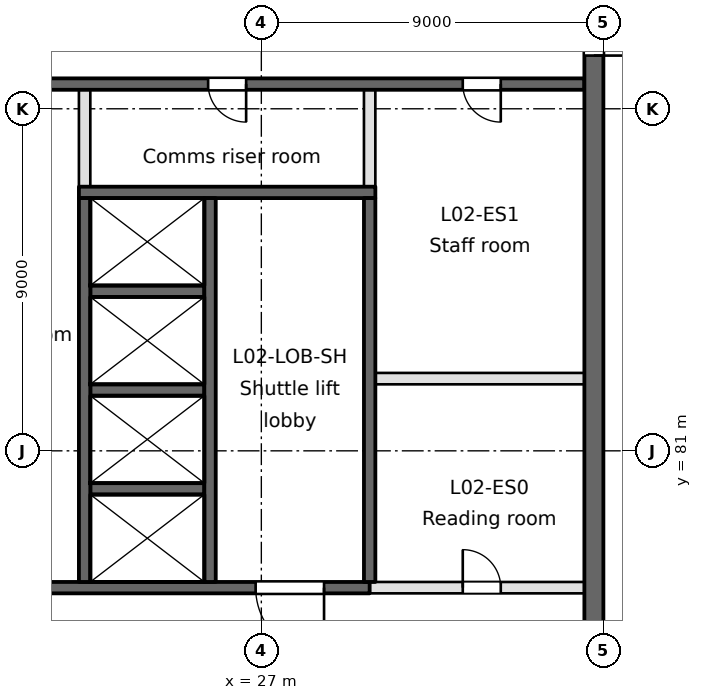
"""IFC4 building model, lengths in metres.
Left out: names, types, materials, properties, quantities, classifications, styles, units other than length and angle.
Written with IfcOpenShell. Run it as: python <this file> out.ifc"""

import sys

from ifc_helpers import new_model, si_unit, direction, frame, frame_2d, origin, place, context, subcontext, project, spatial, rectangle, extrude, element, fill, save


model = new_model("IFC4")
c1 = context("Model", 3, precision=1e-05, world=origin(), true_north=direction((0.0, 1.0)))
c2 = subcontext(c1, "Body", "Model", "MODEL_VIEW")
j1 = project(units=[si_unit("LENGTHUNIT", "METRE"), si_unit("PLANEANGLEUNIT", "RADIAN")], contexts=[c1])
p1 = place(None, origin())
s1 = spatial("IfcSite", under=j1, at=p1, CompositionType="ELEMENT")
p2 = place(p1, origin())
s2 = spatial("IfcBuilding", under=s1, at=p2, CompositionType="ELEMENT")
p3 = place(p2, frame((0.0, 0.0, 11.4)))
s3 = spatial("IfcBuildingStorey", under=s2, at=p3, CompositionType="ELEMENT", Elevation=11.4)
p4 = place(p3, frame((0.9, 77.4, -0.35), z_axis=(0.0, 0.0, 1.0), x_axis=(1.0, 0.0, 0.0)))
e1 = element("IfcWall", 1, at=p4, inside=s3, PredefinedType="SOLIDWALL", context=c2, shape_type="SweptSolid", body=[
    extrude(rectangle(XDim=28.95, YDim=0.3, at=frame_2d((14.475, 0.0))), origin(), (0.0, 0.0, 1.0), 5.4),
])
p5 = place(p4, frame((4.35, 0.0, 0.35)))
e2 = element("IfcOpeningElement", 2, at=p5, cuts=e1, PredefinedType="OPENING", context=c2, shape_type="SweptSolid", body=[
    extrude(rectangle(XDim=1.8, YDim=2.1, at=frame_2d((0.9, 1.05))), frame((0.0, 0.15, 0.0), z_axis=(0.0, -1.0, 0.0), x_axis=(1.0, 0.0, 0.0)), (0.0, 0.0, 1.0), 0.3),
])
p6 = place(p4, frame((25.95, 0.0, 0.35)))
e3 = element("IfcOpeningElement", 3, at=p6, cuts=e1, PredefinedType="OPENING", context=c2, shape_type="SweptSolid", body=[
    extrude(rectangle(XDim=1.8, YDim=2.1, at=frame_2d((0.9, 1.05))), frame((0.0, 0.15, 0.0), z_axis=(0.0, -1.0, 0.0), x_axis=(1.0, 0.0, 0.0)), (0.0, 0.0, 1.0), 0.3),
])
p7 = place(p4, frame((11.95, 0.0, 0.35)))
e4 = element("IfcOpeningElement", 4, at=p7, cuts=e1, PredefinedType="OPENING", context=c2, shape_type="SweptSolid", body=[
    extrude(rectangle(XDim=1.0, YDim=2.1, at=frame_2d((0.5, 1.05))), frame((0.0, 0.15, 0.0), z_axis=(0.0, -1.0, 0.0), x_axis=(1.0, 0.0, 0.0)), (0.0, 0.0, 1.0), 0.3),
])
p8 = place(p4, frame((19.15, 0.0, 0.35)))
e5 = element("IfcOpeningElement", 5, at=p8, cuts=e1, PredefinedType="OPENING", context=c2, shape_type="SweptSolid", body=[
    extrude(rectangle(XDim=1.0, YDim=2.1, at=frame_2d((0.5, 1.05))), frame((0.0, 0.15, 0.0), z_axis=(0.0, -1.0, 0.0), x_axis=(1.0, 0.0, 0.0)), (0.0, 0.0, 1.0), 0.3),
])
p9 = place(p3, frame((29.85, 77.4, 0.0), z_axis=(0.0, 0.0, 1.0), x_axis=(1.0, 0.0, 0.0)))
e6 = element("IfcWall", 6, at=p9, inside=s3, PredefinedType="PARTITIONING", context=c2, shape_type="SweptSolid", body=[
    extrude(rectangle(XDim=5.65, YDim=0.3, at=frame_2d((2.825, 0.0))), origin(), (0.0, 0.0, 1.0), 5.05),
])
p10 = place(p9, frame((2.45, 0.0, 0.0)))
e7 = element("IfcOpeningElement", 7, at=p10, cuts=e6, PredefinedType="OPENING", context=c2, shape_type="SweptSolid", body=[
    extrude(rectangle(XDim=1.0, YDim=2.1, at=frame_2d((0.5, 1.05))), frame((0.0, 0.15, 0.0), z_axis=(0.0, -1.0, 0.0), x_axis=(1.0, 0.0, 0.0)), (0.0, 0.0, 1.0), 0.3),
])
for number, where, z_axis, x_axis in (
    (8, (22.5, 80.0, -0.35), (0.0, 0.0, 1.0), (1.0, 0.0, 0.0)),
    (9, (22.5, 82.6, -0.35), (0.0, 0.0, 1.0), (1.0, 0.0, 0.0)),
):
    element("IfcWall", number, at=place(p3, frame(where, z_axis=z_axis, x_axis=x_axis)), inside=s3, PredefinedType="SOLIDWALL", context=c2, shape_type="SweptSolid", body=[
        extrude(rectangle(XDim=3.0, YDim=0.3, at=frame_2d((1.5, 0.0))), origin(), (0.0, 0.0, 1.0), 5.4),
    ])
p11 = place(p3, frame((30.0, 82.9, 0.0), z_axis=(0.0, 0.0, 1.0), x_axis=(1.0, 0.0, 0.0)))
e10 = element("IfcWall", 10, at=p11, inside=s3, PredefinedType="PARTITIONING", context=c2, shape_type="SweptSolid", body=[
    extrude(rectangle(XDim=5.5, YDim=0.3, at=frame_2d((2.75, 0.0))), origin(), (0.0, 0.0, 1.0), 5.05),
])
p12 = place(p3, frame((22.5, 85.2, -0.35), z_axis=(0.0, 0.0, 1.0), x_axis=(1.0, 0.0, 0.0)))
e11 = element("IfcWall", 11, at=p12, inside=s3, PredefinedType="SOLIDWALL", context=c2, shape_type="SweptSolid", body=[
    extrude(rectangle(XDim=3.0, YDim=0.3, at=frame_2d((1.5, 0.0))), origin(), (0.0, 0.0, 1.0), 5.4),
])
p13 = place(p3, frame((22.2, 87.8, -0.35), z_axis=(0.0, 0.0, 1.0), x_axis=(1.0, 0.0, 0.0)))
e12 = element("IfcWall", 12, at=p13, inside=s3, PredefinedType="SOLIDWALL", context=c2, shape_type="SweptSolid", body=[
    extrude(rectangle(XDim=7.8, YDim=0.3, at=frame_2d((3.9, 0.0))), origin(), (0.0, 0.0, 1.0), 5.4),
])
p14 = place(p3, frame((0.9, 90.65, -0.35), z_axis=(0.0, 0.0, 1.0), x_axis=(1.0, 0.0, 0.0)))
e13 = element("IfcWall", 13, at=p14, inside=s3, PredefinedType="SOLIDWALL", context=c2, shape_type="SweptSolid", body=[
    extrude(rectangle(XDim=34.6, YDim=0.3, at=frame_2d((17.3, 0.0))), origin(), (0.0, 0.0, 1.0), 5.4),
])
p15 = place(p14, frame((4.75, 0.0, 0.35)))
e14 = element("IfcOpeningElement", 14, at=p15, cuts=e13, PredefinedType="OPENING", context=c2, shape_type="SweptSolid", body=[
    extrude(rectangle(XDim=1.0, YDim=2.1, at=frame_2d((0.5, 1.05))), frame((0.0, 0.15, 0.0), z_axis=(0.0, -1.0, 0.0), x_axis=(1.0, 0.0, 0.0)), (0.0, 0.0, 1.0), 0.3),
])
p16 = place(p14, frame((24.7, 0.0, 0.35)))
e15 = element("IfcOpeningElement", 15, at=p16, cuts=e13, PredefinedType="OPENING", context=c2, shape_type="SweptSolid", body=[
    extrude(rectangle(XDim=1.0, YDim=2.1, at=frame_2d((0.5, 1.05))), frame((0.0, 0.15, 0.0), z_axis=(0.0, -1.0, 0.0), x_axis=(1.0, 0.0, 0.0)), (0.0, 0.0, 1.0), 0.3),
])
p17 = place(p14, frame((15.55, 0.0, 0.35)))
e16 = element("IfcOpeningElement", 16, at=p17, cuts=e13, PredefinedType="OPENING", context=c2, shape_type="SweptSolid", body=[
    extrude(rectangle(XDim=1.0, YDim=2.1, at=frame_2d((0.5, 1.05))), frame((0.0, 0.15, 0.0), z_axis=(0.0, -1.0, 0.0), x_axis=(1.0, 0.0, 0.0)), (0.0, 0.0, 1.0), 0.3),
])
p18 = place(p14, frame((31.4, 0.0, 0.35)))
e17 = element("IfcOpeningElement", 17, at=p18, cuts=e13, PredefinedType="OPENING", context=c2, shape_type="SweptSolid", body=[
    extrude(rectangle(XDim=1.0, YDim=2.1, at=frame_2d((0.5, 1.05))), frame((0.0, 0.15, 0.0), z_axis=(0.0, -1.0, 0.0), x_axis=(1.0, 0.0, 0.0)), (0.0, 0.0, 1.0), 0.3),
])
p19 = place(p3, frame((22.35, 77.55, -0.35), z_axis=(0.0, 0.0, 1.0), x_axis=(0.0, 1.0, 0.0)))
e18 = element("IfcWall", 18, at=p19, inside=s3, PredefinedType="SOLIDWALL", context=c2, shape_type="SweptSolid", body=[
    extrude(rectangle(XDim=10.1, YDim=0.3, at=frame_2d((5.05, 0.0))), origin(), (0.0, 0.0, 1.0), 5.4),
])
p20 = place(p3, frame((22.35, 87.95, 0.0), z_axis=(0.0, 0.0, 1.0), x_axis=(0.0, 1.0, 0.0)))
e19 = element("IfcWall", 19, at=p20, inside=s3, PredefinedType="PARTITIONING", context=c2, shape_type="SweptSolid", body=[
    extrude(rectangle(XDim=2.55, YDim=0.3, at=frame_2d((1.275, 0.0))), origin(), (0.0, 0.0, 1.0), 5.05),
])
for number, where, z_axis, x_axis in (
    (20, (25.65, 77.55, -0.35), (0.0, 0.0, 1.0), (0.0, 1.0, 0.0)),
    (21, (29.85, 77.55, -0.35), (0.0, 0.0, 1.0), (0.0, 1.0, 0.0)),
):
    element("IfcWall", number, at=place(p3, frame(where, z_axis=z_axis, x_axis=x_axis)), inside=s3, PredefinedType="SOLIDWALL", context=c2, shape_type="SweptSolid", body=[
        extrude(rectangle(XDim=10.1, YDim=0.3, at=frame_2d((5.05, 0.0))), origin(), (0.0, 0.0, 1.0), 5.4),
    ])
p21 = place(p3, frame((29.85, 87.95, 0.0), z_axis=(0.0, 0.0, 1.0), x_axis=(0.0, 1.0, 0.0)))
e22 = element("IfcWall", 22, at=p21, inside=s3, PredefinedType="PARTITIONING", context=c2, shape_type="SweptSolid", body=[
    extrude(rectangle(XDim=2.55, YDim=0.3, at=frame_2d((1.275, 0.0))), origin(), (0.0, 0.0, 1.0), 5.05),
])
p22 = place(p3, frame((35.75, 63.5, -0.35), z_axis=(0.0, 0.0, 1.0), x_axis=(0.0, 1.0, 0.0)))
e23 = element("IfcWall", 23, at=p22, inside=s3, PredefinedType="SOLIDWALL", context=c2, shape_type="SweptSolid", body=[
    extrude(rectangle(XDim=34.6, YDim=0.5, at=frame_2d((17.3, 0.0))), origin(), (0.0, 0.0, 1.0), 5.4),
])
p23 = place(p22, frame((9.7, 0.0, 0.35)))
e24 = element("IfcOpeningElement", 24, at=p23, cuts=e23, PredefinedType="OPENING", context=c2, shape_type="SweptSolid", body=[
    extrude(rectangle(XDim=2.4, YDim=2.1, at=frame_2d((1.2, 1.05))), frame((0.0, 0.25, 0.0), z_axis=(0.0, -1.0, 0.0), x_axis=(1.0, 0.0, 0.0)), (0.0, 0.0, 1.0), 0.5),
])
p24 = place(p22, frame((27.9, 0.0, 0.35)))
e25 = element("IfcOpeningElement", 25, at=p24, cuts=e23, PredefinedType="OPENING", context=c2, shape_type="SweptSolid", body=[
    extrude(rectangle(XDim=1.5, YDim=2.1, at=frame_2d((0.75, 1.05))), frame((0.0, 0.25, 0.0), z_axis=(0.0, -1.0, 0.0), x_axis=(1.0, 0.0, 0.0)), (0.0, 0.0, 1.0), 0.5),
])
p25 = place(p22, frame((1.5, 0.0, 0.35)))
e26 = element("IfcOpeningElement", 26, at=p25, cuts=e23, PredefinedType="OPENING", context=c2, shape_type="SweptSolid", body=[
    extrude(rectangle(XDim=1.2, YDim=2.1, at=frame_2d((0.6, 1.05))), frame((0.0, 0.25, 0.0), z_axis=(0.0, -1.0, 0.0), x_axis=(1.0, 0.0, 0.0)), (0.0, 0.0, 1.0), 0.5),
])
p26 = place(p6, frame((1.8, 0.0, 0.0), z_axis=(0.0, 0.0, 1.0), x_axis=(-1.0, 0.0, 0.0)))
e27 = element("IfcDoor", 27, at=p26, inside=s3, OperationType="SINGLE_SWING_LEFT", PredefinedType="DOOR", context=c2, shape_type="SweptSolid", body=[
    extrude(rectangle(XDim=1.8, YDim=2.1, at=frame_2d((0.9, 1.05))), frame((0.0, 0.025, 0.0), z_axis=(0.0, -1.0, 0.0), x_axis=(1.0, 0.0, 0.0)), (0.0, 0.0, 1.0), 0.05),
])
fill(e3, e27)
p27 = place(p24, frame((1.5, 0.0, 0.0), z_axis=(0.0, 0.0, 1.0), x_axis=(-1.0, 0.0, 0.0)))
e28 = element("IfcDoor", 28, at=p27, inside=s3, OperationType="SINGLE_SWING_RIGHT", PredefinedType="DOOR", context=c2, shape_type="SweptSolid", body=[
    extrude(rectangle(XDim=1.5, YDim=2.1, at=frame_2d((0.75, 1.05))), frame((0.0, 0.025, 0.0), z_axis=(0.0, -1.0, 0.0), x_axis=(1.0, 0.0, 0.0)), (0.0, 0.0, 1.0), 0.05),
])
fill(e25, e28)
p28 = place(p16, frame((1.0, 0.0, 0.0), z_axis=(0.0, 0.0, 1.0), x_axis=(-1.0, 0.0, 0.0)))
e29 = element("IfcDoor", 29, at=p28, inside=s3, OperationType="SINGLE_SWING_LEFT", PredefinedType="DOOR", context=c2, shape_type="SweptSolid", body=[
    extrude(rectangle(XDim=1.0, YDim=2.1, at=frame_2d((0.5, 1.05))), frame((0.0, 0.025, 0.0), z_axis=(0.0, -1.0, 0.0), x_axis=(1.0, 0.0, 0.0)), (0.0, 0.0, 1.0), 0.05),
])
fill(e15, e29)
p29 = place(p10, origin())
e30 = element("IfcDoor", 30, at=p29, inside=s3, OperationType="SINGLE_SWING_LEFT", PredefinedType="DOOR", context=c2, shape_type="SweptSolid", body=[
    extrude(rectangle(XDim=1.0, YDim=2.1, at=frame_2d((0.5, 1.05))), frame((0.0, 0.025, 0.0), z_axis=(0.0, -1.0, 0.0), x_axis=(1.0, 0.0, 0.0)), (0.0, 0.0, 1.0), 0.05),
])
fill(e7, e30)
p30 = place(p18, frame((1.0, 0.0, 0.0), z_axis=(0.0, 0.0, 1.0), x_axis=(-1.0, 0.0, 0.0)))
e31 = element("IfcDoor", 31, at=p30, inside=s3, OperationType="SINGLE_SWING_LEFT", PredefinedType="DOOR", context=c2, shape_type="SweptSolid", body=[
    extrude(rectangle(XDim=1.0, YDim=2.1, at=frame_2d((0.5, 1.05))), frame((0.0, 0.025, 0.0), z_axis=(0.0, -1.0, 0.0), x_axis=(1.0, 0.0, 0.0)), (0.0, 0.0, 1.0), 0.05),
])
fill(e17, e31)
save(model, sys.argv[1])
